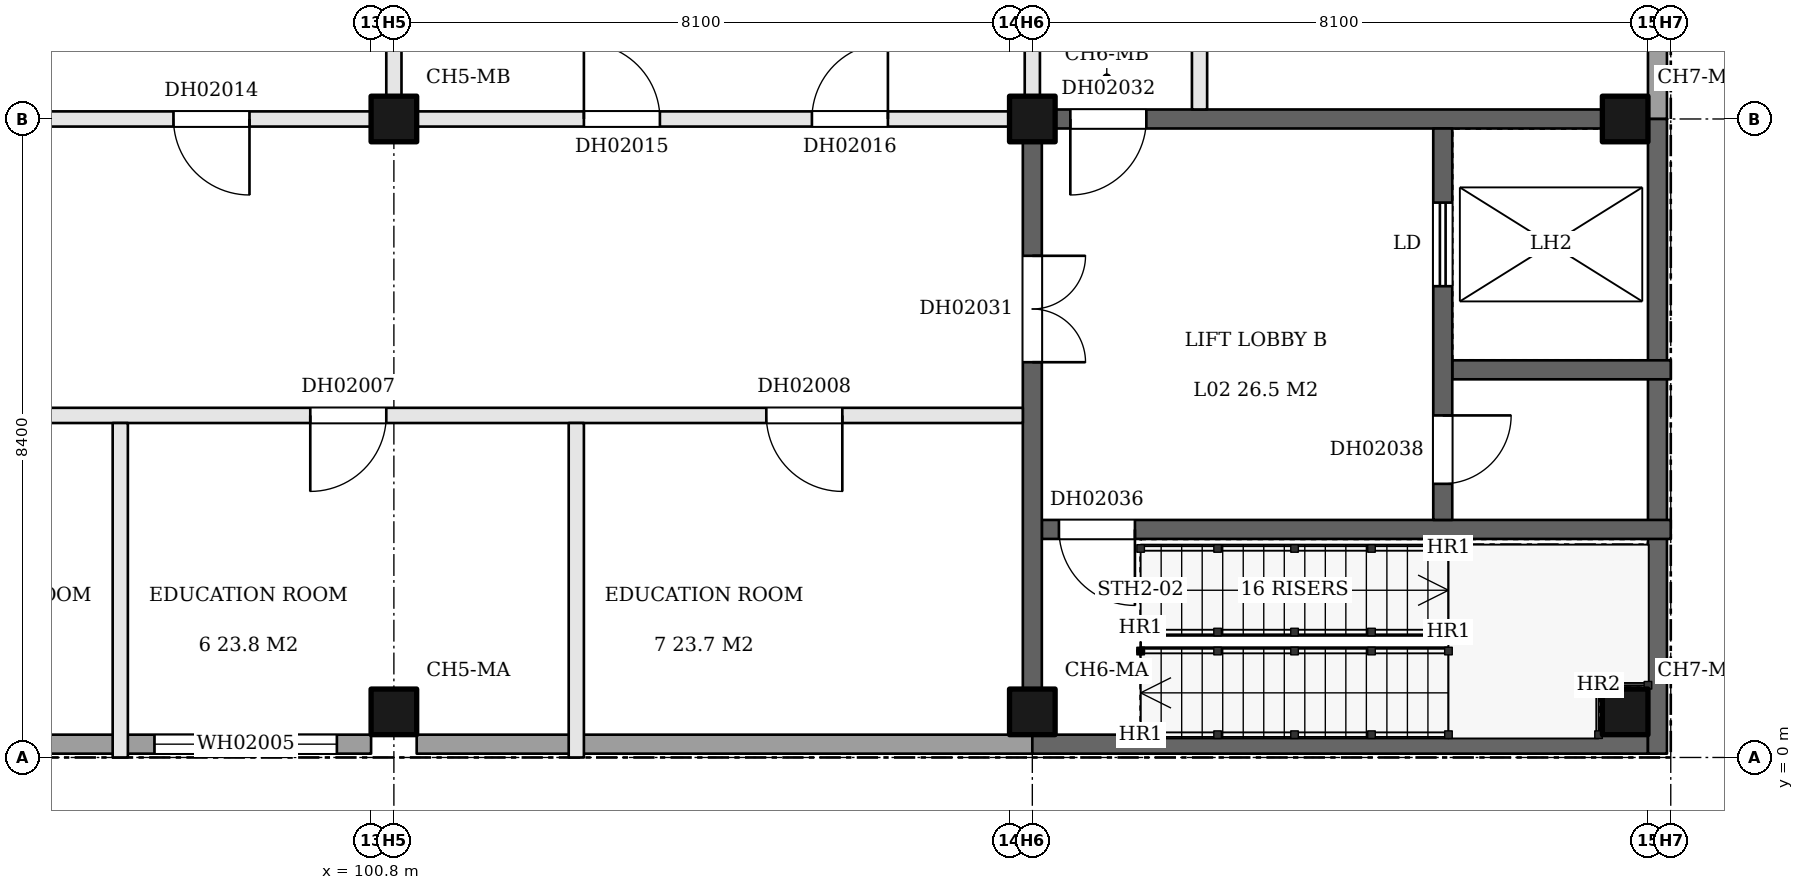
"""IFC4 building model, lengths in metres.
Left out: names, types, materials, properties, quantities, classifications, styles, units other than length and angle.
Written with IfcOpenShell. Run it as: python <this file> out.ifc"""

import sys

from ifc_helpers import new_model, si_unit, direction, frame, frame_2d, origin, origin_2d, place, context, subcontext, project, spatial, rectangle, extrude, element, fill, save


model = new_model("IFC4")
c1 = context("Model", 3, precision=1e-05, world=origin(), true_north=direction((0.0, 1.0)))
c2 = subcontext(c1, "Body", "Model", "MODEL_VIEW")
j1 = project(units=[si_unit("LENGTHUNIT", "METRE"), si_unit("PLANEANGLEUNIT", "RADIAN")], contexts=[c1])
p1 = place(None, origin())
s1 = spatial("IfcSite", under=j1, at=p1, CompositionType="ELEMENT")
p2 = place(p1, origin())
s2 = spatial("IfcBuilding", under=s1, at=p2, CompositionType="ELEMENT")
p3 = place(p2, frame((0.0, 0.0, 14.4)))
s3 = spatial("IfcBuildingStorey", under=s2, at=p3, CompositionType="ELEMENT", Elevation=14.4)
for number, where, z_axis, x_axis in (
    (1, (101.1, 0.6, 0.0), (0.0, 0.0, 1.0), (1.0, 0.0, 0.0)),
    (2, (101.1, 8.4, 0.0), (0.0, 0.0, 1.0), (1.0, 0.0, 0.0)),
    (3, (109.5, 0.6, 0.0), (0.0, 0.0, 1.0), (1.0, 0.0, 0.0)),
    (4, (109.5, 8.4, 0.0), (0.0, 0.0, 1.0), (1.0, 0.0, 0.0)),
    (5, (117.3, 0.6, 0.0), (0.0, 0.0, 1.0), (1.0, 0.0, 0.0)),
    (6, (117.3, 8.4, 0.0), (0.0, 0.0, 1.0), (1.0, 0.0, 0.0)),
):
    element("IfcColumn", number, at=place(p3, frame(where, z_axis=z_axis, x_axis=x_axis)), inside=s3, PredefinedType="COLUMN", context=c2, shape_type="SweptSolid", body=[
        extrude(rectangle(XDim=0.6, YDim=0.6, at=origin_2d()), origin(), (0.0, 0.0, 1.0), 5.1),
    ])
p4 = place(p3, frame((93.0, 0.175, 0.0), z_axis=(0.0, 0.0, 1.0), x_axis=(1.0, 0.0, 0.0)))
e7 = element("IfcWall", 7, at=p4, inside=s3, PredefinedType="SOLIDWALL", context=c2, shape_type="SweptSolid", body=[
    extrude(rectangle(XDim=7.8, YDim=0.25, at=frame_2d((3.9, 0.0))), origin(), (0.0, 0.0, 1.0), 5.1),
])
p5 = place(p4, frame((1.05, 0.0, 0.9)))
e8 = element("IfcOpeningElement", 8, at=p5, cuts=e7, PredefinedType="OPENING", context=c2, shape_type="SweptSolid", body=[
    extrude(rectangle(XDim=2.4, YDim=1.5, at=frame_2d((1.2, 0.75))), frame((0.0, 0.135, 0.0), z_axis=(0.0, -1.0, 0.0), x_axis=(1.0, 0.0, 0.0)), (0.0, 0.0, 1.0), 0.27),
])
p6 = place(p4, frame((4.95, 0.0, 0.9)))
e9 = element("IfcOpeningElement", 9, at=p6, cuts=e7, PredefinedType="OPENING", context=c2, shape_type="SweptSolid", body=[
    extrude(rectangle(XDim=2.4, YDim=1.5, at=frame_2d((1.2, 0.75))), frame((0.0, 0.135, 0.0), z_axis=(0.0, -1.0, 0.0), x_axis=(1.0, 0.0, 0.0)), (0.0, 0.0, 1.0), 0.27),
])
p7 = place(p3, frame((101.4, 0.175, 0.0), z_axis=(0.0, 0.0, 1.0), x_axis=(1.0, 0.0, 0.0)))
e10 = element("IfcWall", 10, at=p7, inside=s3, PredefinedType="SOLIDWALL", context=c2, shape_type="SweptSolid", body=[
    extrude(rectangle(XDim=8.1, YDim=0.25, at=frame_2d((4.05, 0.0))), origin(), (0.0, 0.0, 1.0), 5.1),
])
p8 = place(p3, frame((109.5, 0.175, 0.0), z_axis=(0.0, 0.0, 1.0), x_axis=(1.0, 0.0, 0.0)))
e11 = element("IfcWall", 11, at=p8, inside=s3, PredefinedType="SHEAR", context=c2, shape_type="SweptSolid", body=[
    extrude(rectangle(XDim=8.1, YDim=0.25, at=frame_2d((4.05, 0.0))), origin(), (0.0, 0.0, 1.0), 5.1),
])
p9 = place(p3, frame((109.625, 3.0, 0.0), z_axis=(0.0, 0.0, 1.0), x_axis=(1.0, 0.0, 0.0)))
e12 = element("IfcWall", 12, at=p9, inside=s3, PredefinedType="SHEAR", context=c2, shape_type="SweptSolid", body=[
    extrude(rectangle(XDim=8.275, YDim=0.25, at=frame_2d((4.137, 0.0))), origin(), (0.0, 0.0, 1.0), 5.1),
])
p10 = place(p9, frame((0.225, 0.0, 0.0)))
e13 = element("IfcOpeningElement", 13, at=p10, cuts=e12, PredefinedType="OPENING", context=c2, shape_type="SweptSolid", body=[
    extrude(rectangle(XDim=1.0, YDim=2.1, at=frame_2d((0.5, 1.05))), frame((0.0, 0.135, 0.0), z_axis=(0.0, -1.0, 0.0), x_axis=(1.0, 0.0, 0.0)), (0.0, 0.0, 1.0), 0.27),
])
p11 = place(p3, frame((68.4, 4.5, 0.0), z_axis=(0.0, 0.0, 1.0), x_axis=(1.0, 0.0, 0.0)))
e14 = element("IfcWall", 14, at=p11, inside=s3, PredefinedType="PARTITIONING", context=c2, shape_type="SweptSolid", body=[
    extrude(rectangle(XDim=40.975, YDim=0.2, at=frame_2d((20.488, 0.0))), origin(), (0.0, 0.0, 1.0), 5.1),
])
p12 = place(p11, frame((1.6, 0.0, 0.0)))
e15 = element("IfcOpeningElement", 15, at=p12, cuts=e14, PredefinedType="OPENING", context=c2, shape_type="SweptSolid", body=[
    extrude(rectangle(XDim=1.0, YDim=2.1, at=frame_2d((0.5, 1.05))), frame((0.0, 0.11, 0.0), z_axis=(0.0, -1.0, 0.0), x_axis=(1.0, 0.0, 0.0)), (0.0, 0.0, 1.0), 0.22),
])
p13 = place(p11, frame((7.6, 0.0, 0.0)))
e16 = element("IfcOpeningElement", 16, at=p13, cuts=e14, PredefinedType="OPENING", context=c2, shape_type="SweptSolid", body=[
    extrude(rectangle(XDim=1.0, YDim=2.1, at=frame_2d((0.5, 1.05))), frame((0.0, 0.11, 0.0), z_axis=(0.0, -1.0, 0.0), x_axis=(1.0, 0.0, 0.0)), (0.0, 0.0, 1.0), 0.22),
])
p14 = place(p11, frame((13.6, 0.0, 0.0)))
e17 = element("IfcOpeningElement", 17, at=p14, cuts=e14, PredefinedType="OPENING", context=c2, shape_type="SweptSolid", body=[
    extrude(rectangle(XDim=1.0, YDim=2.1, at=frame_2d((0.5, 1.05))), frame((0.0, 0.11, 0.0), z_axis=(0.0, -1.0, 0.0), x_axis=(1.0, 0.0, 0.0)), (0.0, 0.0, 1.0), 0.22),
])
p15 = place(p11, frame((19.6, 0.0, 0.0)))
e18 = element("IfcOpeningElement", 18, at=p15, cuts=e14, PredefinedType="OPENING", context=c2, shape_type="SweptSolid", body=[
    extrude(rectangle(XDim=1.0, YDim=2.1, at=frame_2d((0.5, 1.05))), frame((0.0, 0.11, 0.0), z_axis=(0.0, -1.0, 0.0), x_axis=(1.0, 0.0, 0.0)), (0.0, 0.0, 1.0), 0.22),
])
p16 = place(p11, frame((25.6, 0.0, 0.0)))
e19 = element("IfcOpeningElement", 19, at=p16, cuts=e14, PredefinedType="OPENING", context=c2, shape_type="SweptSolid", body=[
    extrude(rectangle(XDim=1.0, YDim=2.1, at=frame_2d((0.5, 1.05))), frame((0.0, 0.11, 0.0), z_axis=(0.0, -1.0, 0.0), x_axis=(1.0, 0.0, 0.0)), (0.0, 0.0, 1.0), 0.22),
])
p17 = place(p11, frame((31.6, 0.0, 0.0)))
e20 = element("IfcOpeningElement", 20, at=p17, cuts=e14, PredefinedType="OPENING", context=c2, shape_type="SweptSolid", body=[
    extrude(rectangle(XDim=1.0, YDim=2.1, at=frame_2d((0.5, 1.05))), frame((0.0, 0.11, 0.0), z_axis=(0.0, -1.0, 0.0), x_axis=(1.0, 0.0, 0.0)), (0.0, 0.0, 1.0), 0.22),
])
p18 = place(p11, frame((37.6, 0.0, 0.0)))
e21 = element("IfcOpeningElement", 21, at=p18, cuts=e14, PredefinedType="OPENING", context=c2, shape_type="SweptSolid", body=[
    extrude(rectangle(XDim=1.0, YDim=2.1, at=frame_2d((0.5, 1.05))), frame((0.0, 0.11, 0.0), z_axis=(0.0, -1.0, 0.0), x_axis=(1.0, 0.0, 0.0)), (0.0, 0.0, 1.0), 0.22),
])
p19 = place(p3, frame((115.025, 5.1, 0.0), z_axis=(0.0, 0.0, 1.0), x_axis=(1.0, 0.0, 0.0)))
e22 = element("IfcWall", 22, at=p19, inside=s3, PredefinedType="SHEAR", context=c2, shape_type="SweptSolid", body=[
    extrude(rectangle(XDim=2.875, YDim=0.25, at=frame_2d((1.438, 0.0))), origin(), (0.0, 0.0, 1.0), 5.1),
])
p20 = place(p3, frame((93.0, 8.4, 0.0), z_axis=(0.0, 0.0, 1.0), x_axis=(1.0, 0.0, 0.0)))
e23 = element("IfcWall", 23, at=p20, inside=s3, PredefinedType="PARTITIONING", context=c2, shape_type="SweptSolid", body=[
    extrude(rectangle(XDim=7.8, YDim=0.2, at=frame_2d((3.9, 0.0))), origin(), (0.0, 0.0, 1.0), 5.1),
])
p21 = place(p20, frame((2.2, 0.0, 0.0)))
e24 = element("IfcOpeningElement", 24, at=p21, cuts=e23, PredefinedType="OPENING", context=c2, shape_type="SweptSolid", body=[
    extrude(rectangle(XDim=1.0, YDim=2.1, at=frame_2d((0.5, 1.05))), frame((0.0, 0.11, 0.0), z_axis=(0.0, -1.0, 0.0), x_axis=(1.0, 0.0, 0.0)), (0.0, 0.0, 1.0), 0.22),
])
p22 = place(p20, frame((5.2, 0.0, 0.0)))
e25 = element("IfcOpeningElement", 25, at=p22, cuts=e23, PredefinedType="OPENING", context=c2, shape_type="SweptSolid", body=[
    extrude(rectangle(XDim=1.0, YDim=2.1, at=frame_2d((0.5, 1.05))), frame((0.0, 0.11, 0.0), z_axis=(0.0, -1.0, 0.0), x_axis=(1.0, 0.0, 0.0)), (0.0, 0.0, 1.0), 0.22),
])
p23 = place(p3, frame((101.4, 8.4, 0.0), z_axis=(0.0, 0.0, 1.0), x_axis=(1.0, 0.0, 0.0)))
e26 = element("IfcWall", 26, at=p23, inside=s3, PredefinedType="PARTITIONING", context=c2, shape_type="SweptSolid", body=[
    extrude(rectangle(XDim=7.8, YDim=0.2, at=frame_2d((3.9, 0.0))), origin(), (0.0, 0.0, 1.0), 5.1),
])
p24 = place(p23, frame((2.2, 0.0, 0.0)))
e27 = element("IfcOpeningElement", 27, at=p24, cuts=e26, PredefinedType="OPENING", context=c2, shape_type="SweptSolid", body=[
    extrude(rectangle(XDim=1.0, YDim=2.1, at=frame_2d((0.5, 1.05))), frame((0.0, 0.11, 0.0), z_axis=(0.0, -1.0, 0.0), x_axis=(1.0, 0.0, 0.0)), (0.0, 0.0, 1.0), 0.22),
])
p25 = place(p23, frame((5.2, 0.0, 0.0)))
e28 = element("IfcOpeningElement", 28, at=p25, cuts=e26, PredefinedType="OPENING", context=c2, shape_type="SweptSolid", body=[
    extrude(rectangle(XDim=1.0, YDim=2.1, at=frame_2d((0.5, 1.05))), frame((0.0, 0.11, 0.0), z_axis=(0.0, -1.0, 0.0), x_axis=(1.0, 0.0, 0.0)), (0.0, 0.0, 1.0), 0.22),
])
p26 = place(p3, frame((109.8, 8.4, 0.0), z_axis=(0.0, 0.0, 1.0), x_axis=(1.0, 0.0, 0.0)))
e29 = element("IfcWall", 29, at=p26, inside=s3, PredefinedType="SHEAR", context=c2, shape_type="SweptSolid", body=[
    extrude(rectangle(XDim=7.2, YDim=0.25, at=frame_2d((3.6, 0.0))), origin(), (0.0, 0.0, 1.0), 5.1),
])
p27 = place(p26, frame((0.2, 0.0, 0.0)))
e30 = element("IfcOpeningElement", 30, at=p27, cuts=e29, PredefinedType="OPENING", context=c2, shape_type="SweptSolid", body=[
    extrude(rectangle(XDim=1.0, YDim=2.1, at=frame_2d((0.5, 1.05))), frame((0.0, 0.135, 0.0), z_axis=(0.0, -1.0, 0.0), x_axis=(1.0, 0.0, 0.0)), (0.0, 0.0, 1.0), 0.27),
])
p28 = place(p3, frame((97.5, 0.0, 0.0), z_axis=(0.0, 0.0, 1.0), x_axis=(0.0, 1.0, 0.0)))
e31 = element("IfcWall", 31, at=p28, inside=s3, PredefinedType="PARTITIONING", context=c2, shape_type="SweptSolid", body=[
    extrude(rectangle(XDim=4.4, YDim=0.2, at=frame_2d((2.2, 0.0))), origin(), (0.0, 0.0, 1.0), 5.1),
])
p29 = place(p3, frame((101.1, 8.7, 0.0), z_axis=(0.0, 0.0, 1.0), x_axis=(0.0, 1.0, 0.0)))
e32 = element("IfcWall", 32, at=p29, inside=s3, PredefinedType="PARTITIONING", context=c2, shape_type="SweptSolid", body=[
    extrude(rectangle(XDim=7.8, YDim=0.2, at=frame_2d((3.9, 0.0))), origin(), (0.0, 0.0, 1.0), 5.1),
])
p30 = place(p3, frame((103.5, 0.0, 0.0), z_axis=(0.0, 0.0, 1.0), x_axis=(0.0, 1.0, 0.0)))
e33 = element("IfcWall", 33, at=p30, inside=s3, PredefinedType="PARTITIONING", context=c2, shape_type="SweptSolid", body=[
    extrude(rectangle(XDim=4.4, YDim=0.2, at=frame_2d((2.2, 0.0))), origin(), (0.0, 0.0, 1.0), 5.1),
])
p31 = place(p3, frame((109.5, 0.9, 0.0), z_axis=(0.0, 0.0, 1.0), x_axis=(0.0, 1.0, 0.0)))
e34 = element("IfcWall", 34, at=p31, inside=s3, PredefinedType="SHEAR", context=c2, shape_type="SweptSolid", body=[
    extrude(rectangle(XDim=7.2, YDim=0.25, at=frame_2d((3.6, 0.0))), origin(), (0.0, 0.0, 1.0), 5.1),
])
p32 = place(p31, frame((4.3, 0.0, 0.0)))
e35 = element("IfcOpeningElement", 35, at=p32, cuts=e34, PredefinedType="OPENING", context=c2, shape_type="SweptSolid", body=[
    extrude(rectangle(XDim=1.4, YDim=2.1, at=frame_2d((0.7, 1.05))), frame((0.0, 0.135, 0.0), z_axis=(0.0, -1.0, 0.0), x_axis=(1.0, 0.0, 0.0)), (0.0, 0.0, 1.0), 0.27),
])
p33 = place(p3, frame((109.5, 8.7, 0.0), z_axis=(0.0, 0.0, 1.0), x_axis=(0.0, 1.0, 0.0)))
e36 = element("IfcWall", 36, at=p33, inside=s3, PredefinedType="PARTITIONING", context=c2, shape_type="SweptSolid", body=[
    extrude(rectangle(XDim=7.8, YDim=0.2, at=frame_2d((3.9, 0.0))), origin(), (0.0, 0.0, 1.0), 5.1),
])
p34 = place(p3, frame((111.7, 8.525, 0.0), z_axis=(0.0, 0.0, 1.0), x_axis=(0.0, 1.0, 0.0)))
e37 = element("IfcWall", 37, at=p34, inside=s3, PredefinedType="PARTITIONING", context=c2, shape_type="SweptSolid", body=[
    extrude(rectangle(XDim=16.675, YDim=0.2, at=frame_2d((8.337, 0.0))), origin(), (0.0, 0.0, 1.0), 5.1),
])
p35 = place(p34, frame((3.637, 0.0, 0.0)))
e38 = element("IfcOpeningElement", 38, at=p35, cuts=e37, PredefinedType="OPENING", context=c2, shape_type="SweptSolid", body=[
    extrude(rectangle(XDim=1.0, YDim=2.1, at=frame_2d((0.5, 1.05))), frame((0.0, 0.11, 0.0), z_axis=(0.0, -1.0, 0.0), x_axis=(1.0, 0.0, 0.0)), (0.0, 0.0, 1.0), 0.22),
])
p36 = place(p34, frame((11.975, 0.0, 0.0)))
e39 = element("IfcOpeningElement", 39, at=p36, cuts=e37, PredefinedType="OPENING", context=c2, shape_type="SweptSolid", body=[
    extrude(rectangle(XDim=1.0, YDim=2.1, at=frame_2d((0.5, 1.05))), frame((0.0, 0.11, 0.0), z_axis=(0.0, -1.0, 0.0), x_axis=(1.0, 0.0, 0.0)), (0.0, 0.0, 1.0), 0.22),
])
p37 = place(p3, frame((114.9, 3.125, 0.0), z_axis=(0.0, 0.0, 1.0), x_axis=(0.0, 1.0, 0.0)))
e40 = element("IfcWall", 40, at=p37, inside=s3, PredefinedType="SHEAR", context=c2, shape_type="SweptSolid", body=[
    extrude(rectangle(XDim=5.15, YDim=0.25, at=frame_2d((2.575, 0.0))), origin(), (0.0, 0.0, 1.0), 5.1),
])
p38 = place(p37, frame((3.075, 0.0, 0.0)))
e41 = element("IfcOpeningElement", 41, at=p38, cuts=e40, PredefinedType="OPENING", context=c2, shape_type="SweptSolid", body=[
    extrude(rectangle(XDim=1.1, YDim=2.1, at=frame_2d((0.55, 1.05))), frame((0.0, 0.135, 0.0), z_axis=(0.0, -1.0, 0.0), x_axis=(1.0, 0.0, 0.0)), (0.0, 0.0, 1.0), 0.27),
])
p39 = place(p37, frame((0.475, 0.0, 0.0)))
e42 = element("IfcOpeningElement", 42, at=p39, cuts=e40, PredefinedType="OPENING", context=c2, shape_type="SweptSolid", body=[
    extrude(rectangle(XDim=0.9, YDim=2.1, at=frame_2d((0.45, 1.05))), frame((0.0, 0.135, 0.0), z_axis=(0.0, -1.0, 0.0), x_axis=(1.0, 0.0, 0.0)), (0.0, 0.0, 1.0), 0.27),
])
p40 = place(p3, frame((117.725, 0.05, 0.0), z_axis=(0.0, 0.0, 1.0), x_axis=(0.0, 1.0, 0.0)))
e43 = element("IfcWall", 43, at=p40, inside=s3, PredefinedType="SHEAR", context=c2, shape_type="SweptSolid", body=[
    extrude(rectangle(XDim=8.35, YDim=0.25, at=frame_2d((4.175, 0.0))), origin(), (0.0, 0.0, 1.0), 5.1),
])
p41 = place(p3, frame((117.725, 8.4, 0.0), z_axis=(0.0, 0.0, 1.0), x_axis=(0.0, 1.0, 0.0)))
e44 = element("IfcWall", 44, at=p41, inside=s3, PredefinedType="SOLIDWALL", context=c2, shape_type="SweptSolid", body=[
    extrude(rectangle(XDim=16.8, YDim=0.25, at=frame_2d((8.4, 0.0))), origin(), (0.0, 0.0, 1.0), 5.1),
])
p42 = place(p17, frame((1.0, 0.0, 0.0), z_axis=(0.0, 0.0, 1.0), x_axis=(-1.0, 0.0, 0.0)))
e45 = element("IfcDoor", 45, at=p42, inside=s3, OperationType="SINGLE_SWING_RIGHT", PredefinedType="DOOR", context=c2, shape_type="SweptSolid", body=[
    extrude(rectangle(XDim=1.0, YDim=2.1, at=frame_2d((0.5, 1.05))), frame((0.0, 0.025, 0.0), z_axis=(0.0, -1.0, 0.0), x_axis=(1.0, 0.0, 0.0)), (0.0, 0.0, 1.0), 0.05),
])
fill(e20, e45)
p43 = place(p18, frame((1.0, 0.0, 0.0), z_axis=(0.0, 0.0, 1.0), x_axis=(-1.0, 0.0, 0.0)))
e46 = element("IfcDoor", 46, at=p43, inside=s3, OperationType="SINGLE_SWING_LEFT", PredefinedType="DOOR", context=c2, shape_type="SweptSolid", body=[
    extrude(rectangle(XDim=1.0, YDim=2.1, at=frame_2d((0.5, 1.05))), frame((0.0, 0.025, 0.0), z_axis=(0.0, -1.0, 0.0), x_axis=(1.0, 0.0, 0.0)), (0.0, 0.0, 1.0), 0.05),
])
fill(e21, e46)
p44 = place(p22, frame((1.0, 0.0, 0.0), z_axis=(0.0, 0.0, 1.0), x_axis=(-1.0, 0.0, 0.0)))
e47 = element("IfcDoor", 47, at=p44, inside=s3, OperationType="SINGLE_SWING_LEFT", PredefinedType="DOOR", context=c2, shape_type="SweptSolid", body=[
    extrude(rectangle(XDim=1.0, YDim=2.1, at=frame_2d((0.5, 1.05))), frame((0.0, 0.025, 0.0), z_axis=(0.0, -1.0, 0.0), x_axis=(1.0, 0.0, 0.0)), (0.0, 0.0, 1.0), 0.05),
])
fill(e25, e47)
p45 = place(p24, origin())
e48 = element("IfcDoor", 48, at=p45, inside=s3, OperationType="SINGLE_SWING_LEFT", PredefinedType="DOOR", context=c2, shape_type="SweptSolid", body=[
    extrude(rectangle(XDim=1.0, YDim=2.1, at=frame_2d((0.5, 1.05))), frame((0.0, 0.025, 0.0), z_axis=(0.0, -1.0, 0.0), x_axis=(1.0, 0.0, 0.0)), (0.0, 0.0, 1.0), 0.05),
])
fill(e27, e48)
p46 = place(p25, origin())
e49 = element("IfcDoor", 49, at=p46, inside=s3, OperationType="SINGLE_SWING_RIGHT", PredefinedType="DOOR", context=c2, shape_type="SweptSolid", body=[
    extrude(rectangle(XDim=1.0, YDim=2.1, at=frame_2d((0.5, 1.05))), frame((0.0, 0.025, 0.0), z_axis=(0.0, -1.0, 0.0), x_axis=(1.0, 0.0, 0.0)), (0.0, 0.0, 1.0), 0.05),
])
fill(e28, e49)
p47 = place(p32, frame((1.4, 0.0, 0.0), z_axis=(0.0, 0.0, 1.0), x_axis=(-1.0, 0.0, 0.0)))
e50 = element("IfcDoor", 50, at=p47, inside=s3, OperationType="DOUBLE_DOOR_SINGLE_SWING", PredefinedType="DOOR", context=c2, shape_type="SweptSolid", body=[
    extrude(rectangle(XDim=1.4, YDim=2.1, at=frame_2d((0.7, 1.05))), frame((0.0, 0.025, 0.0), z_axis=(0.0, -1.0, 0.0), x_axis=(1.0, 0.0, 0.0)), (0.0, 0.0, 1.0), 0.05),
])
fill(e35, e50)
p48 = place(p27, frame((1.0, 0.0, 0.0), z_axis=(0.0, 0.0, 1.0), x_axis=(-1.0, 0.0, 0.0)))
e51 = element("IfcDoor", 51, at=p48, inside=s3, OperationType="SINGLE_SWING_RIGHT", PredefinedType="DOOR", context=c2, shape_type="SweptSolid", body=[
    extrude(rectangle(XDim=1.0, YDim=2.1, at=frame_2d((0.5, 1.05))), frame((0.0, 0.025, 0.0), z_axis=(0.0, -1.0, 0.0), x_axis=(1.0, 0.0, 0.0)), (0.0, 0.0, 1.0), 0.05),
])
fill(e30, e51)
p49 = place(p10, frame((1.0, 0.0, 0.0), z_axis=(0.0, 0.0, 1.0), x_axis=(-1.0, 0.0, 0.0)))
e52 = element("IfcDoor", 52, at=p49, inside=s3, OperationType="SINGLE_SWING_LEFT", PredefinedType="DOOR", context=c2, shape_type="SweptSolid", body=[
    extrude(rectangle(XDim=1.0, YDim=2.1, at=frame_2d((0.5, 1.05))), frame((0.0, 0.025, 0.0), z_axis=(0.0, -1.0, 0.0), x_axis=(1.0, 0.0, 0.0)), (0.0, 0.0, 1.0), 0.05),
])
fill(e13, e52)
p50 = place(p38, origin())
e53 = element("IfcDoor", 53, at=p50, inside=s3, OperationType="SLIDING_TO_LEFT", PredefinedType="DOOR", context=c2, shape_type="SweptSolid", body=[
    extrude(rectangle(XDim=1.1, YDim=2.1, at=frame_2d((0.55, 1.05))), frame((0.0, 0.025, 0.0), z_axis=(0.0, -1.0, 0.0), x_axis=(1.0, 0.0, 0.0)), (0.0, 0.0, 1.0), 0.05),
])
fill(e41, e53)
p51 = place(p39, frame((0.9, 0.0, 0.0), z_axis=(0.0, 0.0, 1.0), x_axis=(-1.0, 0.0, 0.0)))
e54 = element("IfcDoor", 54, at=p51, inside=s3, OperationType="SINGLE_SWING_LEFT", PredefinedType="DOOR", context=c2, shape_type="SweptSolid", body=[
    extrude(rectangle(XDim=0.9, YDim=2.1, at=frame_2d((0.45, 1.05))), frame((0.0, 0.025, 0.0), z_axis=(0.0, -1.0, 0.0), x_axis=(1.0, 0.0, 0.0)), (0.0, 0.0, 1.0), 0.05),
])
fill(e42, e54)
p52 = place(p6, origin())
e55 = element("IfcWindow", 55, at=p52, inside=s3, PartitioningType="DOUBLE_PANEL_VERTICAL", PredefinedType="WINDOW", context=c2, shape_type="SweptSolid", body=[
    extrude(rectangle(XDim=2.4, YDim=1.5, at=frame_2d((1.2, 0.75))), frame((0.0, 0.03, 0.0), z_axis=(0.0, -1.0, 0.0), x_axis=(1.0, 0.0, 0.0)), (0.0, 0.0, 1.0), 0.06),
])
fill(e9, e55)
save(model, sys.argv[1])
